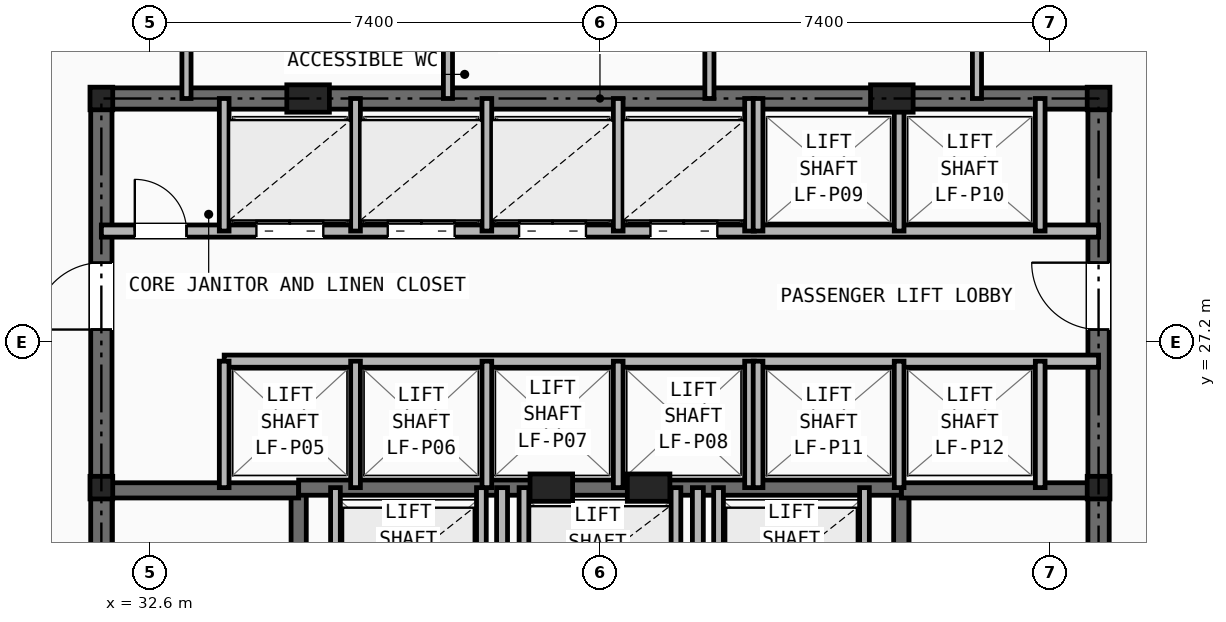
"""IFC4 building model, lengths in metres.
Left out: names, types, materials, properties, quantities, classifications, styles, units other than length and angle.
Written with IfcOpenShell. Run it as: python <this file> out.ifc"""

import sys

from ifc_helpers import new_model, si_unit, direction, frame, frame_2d, origin, origin_2d, place, context, subcontext, project, spatial, rectangle, i_section, extrude, element, fill, save


model = new_model("IFC4")
c1 = context("Model", 3, precision=1e-05, world=origin(), true_north=direction((0.0, 1.0)))
c2 = subcontext(c1, "Body", "Model", "MODEL_VIEW")
j1 = project(units=[si_unit("LENGTHUNIT", "METRE"), si_unit("PLANEANGLEUNIT", "RADIAN")], contexts=[c1])
p1 = place(None, origin())
s1 = spatial("IfcSite", under=j1, at=p1, CompositionType="ELEMENT")
p2 = place(p1, origin())
s2 = spatial("IfcBuilding", under=s1, at=p2, CompositionType="ELEMENT")
p3 = place(p2, frame((0.0, 0.0, 65.6)))
s3 = spatial("IfcBuildingStorey", under=s2, at=p3, CompositionType="ELEMENT", Elevation=65.6)
for number, where, z_axis, x_axis in (
    (1, (31.8, 24.8, 0.0), (0.0, 0.0, 1.0), (1.0, 0.0, 0.0)),
    (2, (48.2, 24.8, 0.0), (0.0, 0.0, 1.0), (1.0, 0.0, 0.0)),
    (3, (31.8, 31.2, 0.0), (0.0, 0.0, 1.0), (1.0, 0.0, 0.0)),
    (4, (48.2, 31.2, 0.0), (0.0, 0.0, 1.0), (1.0, 0.0, 0.0)),
):
    element("IfcColumn", number, at=place(p3, frame(where, z_axis=z_axis, x_axis=x_axis)), inside=s3, PredefinedType="COLUMN", context=c2, shape_type="SweptSolid", body=[
        extrude(i_section(OverallWidth=0.374, OverallDepth=0.372, WebThickness=0.016, FlangeThickness=0.026, at=origin_2d()), origin(), (0.0, 0.0, 1.0), 3.2),
    ])
for number, where, z_axis, x_axis in (
    (5, (35.2, 31.2, 0.0), (0.0, 0.0, 1.0), (1.0, 0.0, 0.0)),
    (6, (44.8, 31.2, 0.0), (0.0, 0.0, 1.0), (1.0, 0.0, 0.0)),
    (7, (39.2, 24.8, 0.0), (0.0, 0.0, 1.0), (1.0, 0.0, 0.0)),
    (8, (40.8, 24.8, 0.0), (0.0, 0.0, 1.0), (1.0, 0.0, 0.0)),
):
    element("IfcColumn", number, at=place(p3, frame(where, z_axis=z_axis, x_axis=x_axis)), inside=s3, PredefinedType="PILASTER", context=c2, shape_type="SweptSolid", body=[
        extrude(rectangle(XDim=0.7, YDim=0.45, at=origin_2d()), origin(), (0.0, 0.0, 1.0), 3.2),
    ])
p4 = place(p3, frame((31.8, 31.2, 0.0), z_axis=(0.0, 0.0, 1.0), x_axis=(1.0, 0.0, 0.0)))
e9 = element("IfcWall", 9, at=p4, inside=s3, PredefinedType="SHEAR", context=c2, shape_type="SweptSolid", body=[
    extrude(rectangle(XDim=16.4, YDim=0.35, at=frame_2d((8.2, 0.0))), origin(), (0.0, 0.0, 1.0), 2.9),
])
p5 = place(p3, frame((31.8, 16.4, 0.0), z_axis=(0.0, 0.0, 1.0), x_axis=(0.0, 1.0, 0.0)))
e10 = element("IfcWall", 10, at=p5, inside=s3, PredefinedType="SHEAR", context=c2, shape_type="SweptSolid", body=[
    extrude(rectangle(XDim=14.8, YDim=0.35, at=frame_2d((7.4, 0.0))), origin(), (0.0, 0.0, 1.0), 2.9),
])
p6 = place(p5, frame((11.0, 0.0, 0.0)))
e11 = element("IfcOpeningElement", 11, at=p6, cuts=e10, PredefinedType="OPENING", context=c2, shape_type="SweptSolid", body=[
    extrude(rectangle(XDim=1.1, YDim=2.15, at=frame_2d((0.55, 1.075))), frame((0.0, 0.185, 0.0), z_axis=(0.0, -1.0, 0.0), x_axis=(1.0, 0.0, 0.0)), (0.0, 0.0, 1.0), 0.37),
])
p7 = place(p3, frame((48.2, 16.4, 0.0), z_axis=(0.0, 0.0, 1.0), x_axis=(0.0, 1.0, 0.0)))
e12 = element("IfcWall", 12, at=p7, inside=s3, PredefinedType="SHEAR", context=c2, shape_type="SweptSolid", body=[
    extrude(rectangle(XDim=14.8, YDim=0.35, at=frame_2d((7.4, 0.0))), origin(), (0.0, 0.0, 1.0), 2.9),
])
p8 = place(p7, frame((11.0, 0.0, 0.0)))
e13 = element("IfcOpeningElement", 13, at=p8, cuts=e12, PredefinedType="OPENING", context=c2, shape_type="SweptSolid", body=[
    extrude(rectangle(XDim=1.1, YDim=2.15, at=frame_2d((0.55, 1.075))), frame((0.0, 0.185, 0.0), z_axis=(0.0, -1.0, 0.0), x_axis=(1.0, 0.0, 0.0)), (0.0, 0.0, 1.0), 0.37),
])
p9 = place(p3, frame((35.045, 16.4, 0.0), z_axis=(0.0, 0.0, 1.0), x_axis=(0.0, 1.0, 0.0)))
e14 = element("IfcWall", 14, at=p9, inside=s3, PredefinedType="SHEAR", context=c2, shape_type="SweptSolid", body=[
    extrude(rectangle(XDim=8.4, YDim=0.25, at=frame_2d((4.2, 0.0))), origin(), (0.0, 0.0, 1.0), 2.9),
])
p10 = place(p9, frame((0.45, 0.0, 0.0)))
e15 = element("IfcOpeningElement", 15, at=p10, cuts=e14, PredefinedType="OPENING", context=c2, shape_type="SweptSolid", body=[
    extrude(rectangle(XDim=0.95, YDim=2.1, at=frame_2d((0.475, 1.05))), frame((0.0, 0.135, 0.0), z_axis=(0.0, -1.0, 0.0), x_axis=(1.0, 0.0, 0.0)), (0.0, 0.0, 1.0), 0.27),
])
p11 = place(p3, frame((31.8, 24.755, 0.0), z_axis=(0.0, 0.0, 1.0), x_axis=(1.0, 0.0, 0.0)))
e16 = element("IfcWall", 16, at=p11, inside=s3, PredefinedType="SHEAR", context=c2, shape_type="SweptSolid", body=[
    extrude(rectangle(XDim=3.245, YDim=0.25, at=frame_2d((1.623, 0.0))), origin(), (0.0, 0.0, 1.0), 2.9),
])
p12 = place(p3, frame((44.955, 16.4, 0.0), z_axis=(0.0, 0.0, 1.0), x_axis=(0.0, 1.0, 0.0)))
e17 = element("IfcWall", 17, at=p12, inside=s3, PredefinedType="SHEAR", context=c2, shape_type="SweptSolid", body=[
    extrude(rectangle(XDim=8.4, YDim=0.25, at=frame_2d((4.2, 0.0))), origin(), (0.0, 0.0, 1.0), 2.9),
])
p13 = place(p12, frame((0.45, 0.0, 0.0)))
e18 = element("IfcOpeningElement", 18, at=p13, cuts=e17, PredefinedType="OPENING", context=c2, shape_type="SweptSolid", body=[
    extrude(rectangle(XDim=0.95, YDim=2.1, at=frame_2d((0.475, 1.05))), frame((0.0, 0.135, 0.0), z_axis=(0.0, -1.0, 0.0), x_axis=(1.0, 0.0, 0.0)), (0.0, 0.0, 1.0), 0.27),
])
p14 = place(p3, frame((44.955, 24.755, 0.0), z_axis=(0.0, 0.0, 1.0), x_axis=(1.0, 0.0, 0.0)))
e19 = element("IfcWall", 19, at=p14, inside=s3, PredefinedType="SHEAR", context=c2, shape_type="SweptSolid", body=[
    extrude(rectangle(XDim=3.245, YDim=0.25, at=frame_2d((1.623, 0.0))), origin(), (0.0, 0.0, 1.0), 2.9),
])
p15 = place(p3, frame((35.045, 24.8, 0.0), z_axis=(0.0, 0.0, 1.0), x_axis=(1.0, 0.0, 0.0)))
e20 = element("IfcWall", 20, at=p15, inside=s3, PredefinedType="SHEAR", context=c2, shape_type="SweptSolid", body=[
    extrude(rectangle(XDim=9.91, YDim=0.25, at=frame_2d((4.955, 0.0))), origin(), (0.0, 0.0, 1.0), 2.9),
])
p16 = place(p3, frame((38.39, 16.4, 0.0), z_axis=(0.0, 0.0, 1.0), x_axis=(0.0, 1.0, 0.0)))
e21 = element("IfcWall", 21, at=p16, inside=s3, PredefinedType="PARTITIONING", context=c2, shape_type="SweptSolid", body=[
    extrude(rectangle(XDim=8.4, YDim=0.18, at=frame_2d((4.2, 0.0))), origin(), (0.0, 0.0, 1.0), 2.351),
])
p17 = place(p16, frame((3.8, 0.0, 0.0)))
e22 = element("IfcOpeningElement", 22, at=p17, cuts=e21, PredefinedType="OPENING", context=c2, shape_type="SweptSolid", body=[
    extrude(rectangle(XDim=0.95, YDim=2.1, at=frame_2d((0.475, 1.05))), frame((0.0, 0.1, 0.0), z_axis=(0.0, -1.0, 0.0), x_axis=(1.0, 0.0, 0.0)), (0.0, 0.0, 1.0), 0.2),
])
p18 = place(p3, frame((41.61, 16.4, 0.0), z_axis=(0.0, 0.0, 1.0), x_axis=(0.0, 1.0, 0.0)))
e23 = element("IfcWall", 23, at=p18, inside=s3, PredefinedType="PARTITIONING", context=c2, shape_type="SweptSolid", body=[
    extrude(rectangle(XDim=8.4, YDim=0.18, at=frame_2d((4.2, 0.0))), origin(), (0.0, 0.0, 1.0), 2.351),
])
for number, where, z_axis, x_axis in (
    (24, (35.65, 22.48, 0.0), (0.0, 0.0, 1.0), (0.0, 1.0, 0.0)),
    (25, (38.05, 22.48, 0.0), (0.0, 0.0, 1.0), (0.0, 1.0, 0.0)),
    (26, (41.95, 22.48, 0.0), (0.0, 0.0, 1.0), (0.0, 1.0, 0.0)),
    (27, (44.35, 22.48, 0.0), (0.0, 0.0, 1.0), (0.0, 1.0, 0.0)),
    (28, (38.75, 22.48, 0.0), (0.0, 0.0, 1.0), (0.0, 1.0, 0.0)),
    (29, (41.25, 22.48, 0.0), (0.0, 0.0, 1.0), (0.0, 1.0, 0.0)),
):
    element("IfcWall", number, at=place(p3, frame(where, z_axis=z_axis, x_axis=x_axis)), inside=s3, PredefinedType="SOLIDWALL", context=c2, shape_type="SweptSolid", body=[
        extrude(rectangle(XDim=2.32, YDim=0.16, at=frame_2d((1.16, 0.0))), origin(), (0.0, 0.0, 1.0), 2.9),
    ])
p19 = place(p3, frame((31.8, 29.02, 0.0), z_axis=(0.0, 0.0, 1.0), x_axis=(1.0, 0.0, 0.0)))
e30 = element("IfcWall", 30, at=p19, inside=s3, PredefinedType="SOLIDWALL", context=c2, shape_type="SweptSolid", body=[
    extrude(rectangle(XDim=16.4, YDim=0.2, at=frame_2d((8.2, 0.0))), origin(), (0.0, 0.0, 1.0), 2.351),
])
p20 = place(p19, frame((0.55, 0.0, 0.0)))
e31 = element("IfcOpeningElement", 31, at=p20, cuts=e30, PredefinedType="OPENING", context=c2, shape_type="SweptSolid", body=[
    extrude(rectangle(XDim=0.85, YDim=2.05, at=frame_2d((0.425, 1.025))), frame((0.0, 0.11, 0.0), z_axis=(0.0, -1.0, 0.0), x_axis=(1.0, 0.0, 0.0)), (0.0, 0.0, 1.0), 0.22),
])
p21 = place(p19, frame((2.55, 0.0, 0.0)))
e32 = element("IfcOpeningElement", 32, at=p21, cuts=e30, PredefinedType="OPENING", context=c2, shape_type="SweptSolid", body=[
    extrude(rectangle(XDim=1.1, YDim=2.15, at=frame_2d((0.55, 1.075))), frame((0.0, 0.11, 0.0), z_axis=(0.0, -1.0, 0.0), x_axis=(1.0, 0.0, 0.0)), (0.0, 0.0, 1.0), 0.22),
])
p22 = place(p19, frame((4.71, 0.0, 0.0)))
e33 = element("IfcOpeningElement", 33, at=p22, cuts=e30, PredefinedType="OPENING", context=c2, shape_type="SweptSolid", body=[
    extrude(rectangle(XDim=1.1, YDim=2.15, at=frame_2d((0.55, 1.075))), frame((0.0, 0.11, 0.0), z_axis=(0.0, -1.0, 0.0), x_axis=(1.0, 0.0, 0.0)), (0.0, 0.0, 1.0), 0.22),
])
p23 = place(p19, frame((6.87, 0.0, 0.0)))
e34 = element("IfcOpeningElement", 34, at=p23, cuts=e30, PredefinedType="OPENING", context=c2, shape_type="SweptSolid", body=[
    extrude(rectangle(XDim=1.1, YDim=2.15, at=frame_2d((0.55, 1.075))), frame((0.0, 0.11, 0.0), z_axis=(0.0, -1.0, 0.0), x_axis=(1.0, 0.0, 0.0)), (0.0, 0.0, 1.0), 0.22),
])
p24 = place(p19, frame((9.03, 0.0, 0.0)))
e35 = element("IfcOpeningElement", 35, at=p24, cuts=e30, PredefinedType="OPENING", context=c2, shape_type="SweptSolid", body=[
    extrude(rectangle(XDim=1.1, YDim=2.15, at=frame_2d((0.55, 1.075))), frame((0.0, 0.11, 0.0), z_axis=(0.0, -1.0, 0.0), x_axis=(1.0, 0.0, 0.0)), (0.0, 0.0, 1.0), 0.22),
])
p25 = place(p3, frame((33.82, 26.88, 0.0), z_axis=(0.0, 0.0, 1.0), x_axis=(1.0, 0.0, 0.0)))
e36 = element("IfcWall", 36, at=p25, inside=s3, PredefinedType="SOLIDWALL", context=c2, shape_type="SweptSolid", body=[
    extrude(rectangle(XDim=14.38, YDim=0.2, at=frame_2d((7.19, 0.0))), origin(), (0.0, 0.0, 1.0), 2.351),
])
p26 = place(p3, frame((33.82, 29.02, 0.0), z_axis=(0.0, 0.0, 1.0), x_axis=(0.0, 1.0, 0.0)))
e37 = element("IfcWall", 37, at=p26, inside=s3, PredefinedType="SOLIDWALL", context=c2, shape_type="SweptSolid", body=[
    extrude(rectangle(XDim=2.18, YDim=0.16, at=frame_2d((1.09, 0.0))), origin(), (0.0, 0.0, 1.0), 2.351),
])
p27 = place(p3, frame((33.82, 24.8, 0.0), z_axis=(0.0, 0.0, 1.0), x_axis=(0.0, 1.0, 0.0)))
e38 = element("IfcWall", 38, at=p27, inside=s3, PredefinedType="SOLIDWALL", context=c2, shape_type="SweptSolid", body=[
    extrude(rectangle(XDim=2.08, YDim=0.16, at=frame_2d((1.04, 0.0))), origin(), (0.0, 0.0, 1.0), 2.9),
])
for number, where, z_axis, x_axis in (
    (39, (35.98, 29.02, 0.0), (0.0, 0.0, 1.0), (0.0, 1.0, 0.0)),
    (40, (38.14, 29.02, 0.0), (0.0, 0.0, 1.0), (0.0, 1.0, 0.0)),
    (41, (40.3, 29.02, 0.0), (0.0, 0.0, 1.0), (0.0, 1.0, 0.0)),
    (42, (42.46, 29.02, 0.0), (0.0, 0.0, 1.0), (0.0, 1.0, 0.0)),
):
    element("IfcWall", number, at=place(p3, frame(where, z_axis=z_axis, x_axis=x_axis)), inside=s3, PredefinedType="SOLIDWALL", context=c2, shape_type="SweptSolid", body=[
        extrude(rectangle(XDim=2.18, YDim=0.16, at=frame_2d((1.09, 0.0))), origin(), (0.0, 0.0, 1.0), 2.351),
    ])
for number, where, z_axis, x_axis in (
    (43, (35.98, 24.8, 0.0), (0.0, 0.0, 1.0), (0.0, 1.0, 0.0)),
    (44, (38.14, 24.8, 0.0), (0.0, 0.0, 1.0), (0.0, 1.0, 0.0)),
    (45, (40.3, 24.8, 0.0), (0.0, 0.0, 1.0), (0.0, 1.0, 0.0)),
    (46, (42.46, 24.8, 0.0), (0.0, 0.0, 1.0), (0.0, 1.0, 0.0)),
):
    element("IfcWall", number, at=place(p3, frame(where, z_axis=z_axis, x_axis=x_axis)), inside=s3, PredefinedType="SOLIDWALL", context=c2, shape_type="SweptSolid", body=[
        extrude(rectangle(XDim=2.08, YDim=0.16, at=frame_2d((1.04, 0.0))), origin(), (0.0, 0.0, 1.0), 2.9),
    ])
for number, where, z_axis, x_axis in (
    (47, (42.6, 29.02, 0.0), (0.0, 0.0, 1.0), (0.0, 1.0, 0.0)),
    (48, (44.92, 29.02, 0.0), (0.0, 0.0, 1.0), (0.0, 1.0, 0.0)),
    (49, (47.24, 29.02, 0.0), (0.0, 0.0, 1.0), (0.0, 1.0, 0.0)),
):
    element("IfcWall", number, at=place(p3, frame(where, z_axis=z_axis, x_axis=x_axis)), inside=s3, PredefinedType="SOLIDWALL", context=c2, shape_type="SweptSolid", body=[
        extrude(rectangle(XDim=2.18, YDim=0.16, at=frame_2d((1.09, 0.0))), origin(), (0.0, 0.0, 1.0), 2.351),
    ])
for number, where, z_axis, x_axis in (
    (50, (42.6, 24.8, 0.0), (0.0, 0.0, 1.0), (0.0, 1.0, 0.0)),
    (51, (44.92, 24.8, 0.0), (0.0, 0.0, 1.0), (0.0, 1.0, 0.0)),
    (52, (47.24, 24.8, 0.0), (0.0, 0.0, 1.0), (0.0, 1.0, 0.0)),
):
    element("IfcWall", number, at=place(p3, frame(where, z_axis=z_axis, x_axis=x_axis)), inside=s3, PredefinedType="SOLIDWALL", context=c2, shape_type="SweptSolid", body=[
        extrude(rectangle(XDim=2.08, YDim=0.16, at=frame_2d((1.04, 0.0))), origin(), (0.0, 0.0, 1.0), 2.9),
    ])
for number, where, z_axis, x_axis in (
    (53, (33.2, 31.2, 0.0), (0.0, 0.0, 1.0), (0.0, 1.0, 0.0)),
    (54, (46.2, 31.2, 0.0), (0.0, 0.0, 1.0), (0.0, 1.0, 0.0)),
    (55, (37.5, 31.2, 0.0), (0.0, 0.0, 1.0), (0.0, 1.0, 0.0)),
    (56, (41.8, 31.2, 0.0), (0.0, 0.0, 1.0), (0.0, 1.0, 0.0)),
):
    element("IfcWall", number, at=place(p3, frame(where, z_axis=z_axis, x_axis=x_axis)), inside=s3, PredefinedType="PARTITIONING", context=c2, shape_type="SweptSolid", body=[
        extrude(rectangle(XDim=2.6, YDim=0.15, at=frame_2d((1.3, 0.0))), origin(), (0.0, 0.0, 1.0), 2.351),
    ])
p28 = place(p20, origin())
e57 = element("IfcDoor", 57, at=p28, inside=s3, OperationType="SINGLE_SWING_LEFT", PredefinedType="DOOR", context=c2, shape_type="SweptSolid", body=[
    extrude(rectangle(XDim=0.85, YDim=2.05, at=frame_2d((0.425, 1.025))), frame((0.0, 0.025, 0.0), z_axis=(0.0, -1.0, 0.0), x_axis=(1.0, 0.0, 0.0)), (0.0, 0.0, 1.0), 0.05),
])
fill(e31, e57)
p29 = place(p6, origin())
e58 = element("IfcDoor", 58, at=p29, inside=s3, OperationType="SINGLE_SWING_LEFT", PredefinedType="DOOR", context=c2, shape_type="SweptSolid", body=[
    extrude(rectangle(XDim=1.1, YDim=2.15, at=frame_2d((0.55, 1.075))), frame((0.0, 0.025, 0.0), z_axis=(0.0, -1.0, 0.0), x_axis=(1.0, 0.0, 0.0)), (0.0, 0.0, 1.0), 0.05),
])
fill(e11, e58)
p30 = place(p8, origin())
e59 = element("IfcDoor", 59, at=p30, inside=s3, OperationType="SINGLE_SWING_RIGHT", PredefinedType="DOOR", context=c2, shape_type="SweptSolid", body=[
    extrude(rectangle(XDim=1.1, YDim=2.15, at=frame_2d((0.55, 1.075))), frame((0.0, 0.025, 0.0), z_axis=(0.0, -1.0, 0.0), x_axis=(1.0, 0.0, 0.0)), (0.0, 0.0, 1.0), 0.05),
])
fill(e13, e59)
p31 = place(p21, origin())
e60 = element("IfcDoor", 60, at=p31, inside=s3, OperationType="DOUBLE_DOOR_SLIDING", PredefinedType="DOOR", context=c2, shape_type="SweptSolid", body=[
    extrude(rectangle(XDim=1.1, YDim=2.15, at=frame_2d((0.55, 1.075))), frame((0.0, 0.025, 0.0), z_axis=(0.0, -1.0, 0.0), x_axis=(1.0, 0.0, 0.0)), (0.0, 0.0, 1.0), 0.05),
])
fill(e32, e60)
p32 = place(p22, origin())
e61 = element("IfcDoor", 61, at=p32, inside=s3, OperationType="DOUBLE_DOOR_SLIDING", PredefinedType="DOOR", context=c2, shape_type="SweptSolid", body=[
    extrude(rectangle(XDim=1.1, YDim=2.15, at=frame_2d((0.55, 1.075))), frame((0.0, 0.025, 0.0), z_axis=(0.0, -1.0, 0.0), x_axis=(1.0, 0.0, 0.0)), (0.0, 0.0, 1.0), 0.05),
])
fill(e33, e61)
p33 = place(p23, origin())
e62 = element("IfcDoor", 62, at=p33, inside=s3, OperationType="DOUBLE_DOOR_SLIDING", PredefinedType="DOOR", context=c2, shape_type="SweptSolid", body=[
    extrude(rectangle(XDim=1.1, YDim=2.15, at=frame_2d((0.55, 1.075))), frame((0.0, 0.025, 0.0), z_axis=(0.0, -1.0, 0.0), x_axis=(1.0, 0.0, 0.0)), (0.0, 0.0, 1.0), 0.05),
])
fill(e34, e62)
p34 = place(p24, origin())
e63 = element("IfcDoor", 63, at=p34, inside=s3, OperationType="DOUBLE_DOOR_SLIDING", PredefinedType="DOOR", context=c2, shape_type="SweptSolid", body=[
    extrude(rectangle(XDim=1.1, YDim=2.15, at=frame_2d((0.55, 1.075))), frame((0.0, 0.025, 0.0), z_axis=(0.0, -1.0, 0.0), x_axis=(1.0, 0.0, 0.0)), (0.0, 0.0, 1.0), 0.05),
])
fill(e35, e63)
save(model, sys.argv[1])
